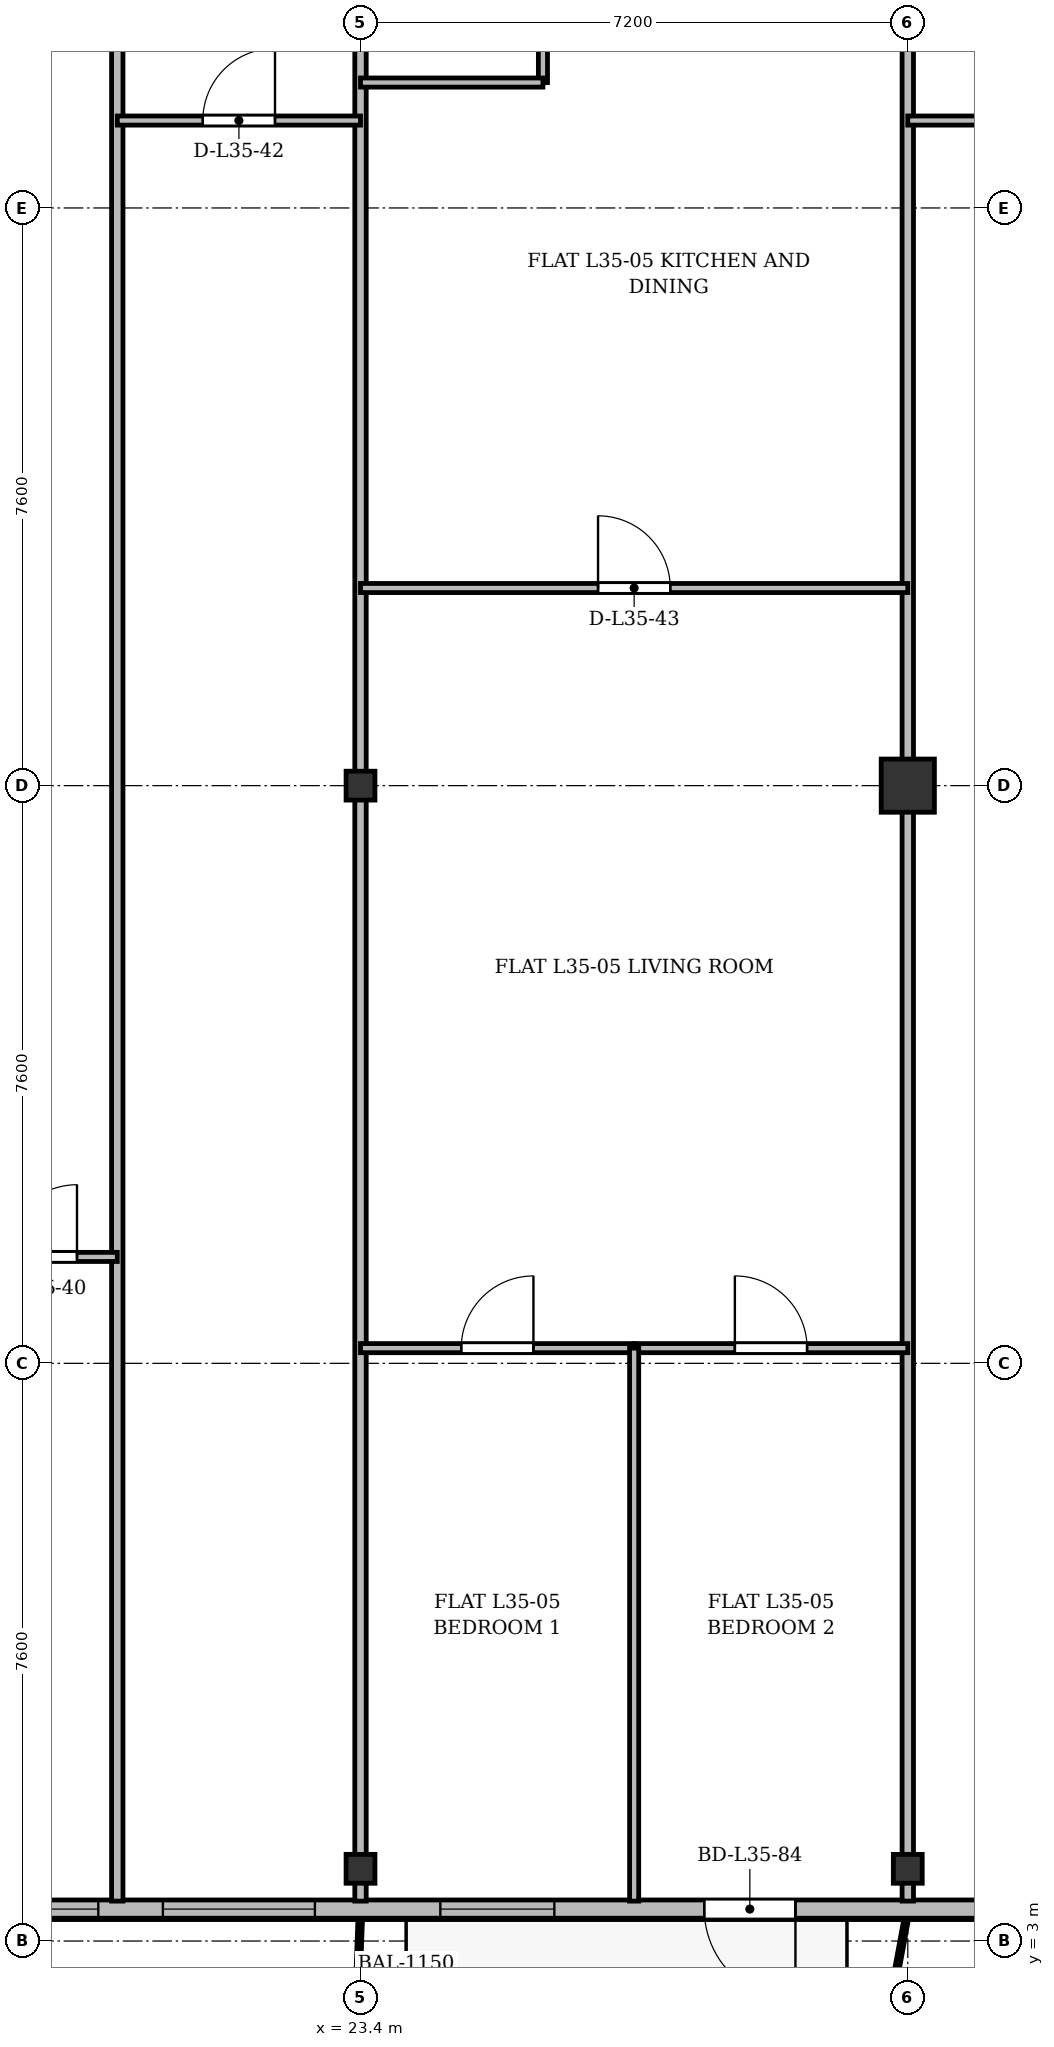
"""IFC4 building model, lengths in metres.
Left out: names, types, materials, properties, quantities, classifications, styles, units other than length and angle.
Written with IfcOpenShell. Run it as: python <this file> out.ifc"""

import sys

from ifc_helpers import new_model, si_unit, direction, frame, frame_2d, origin, origin_2d, place, context, subcontext, project, spatial, rectangle, i_section, extrude, source, transform, mapped, element, fill, save


model = new_model("IFC4")
c1 = context("Model", 3, precision=1e-05, world=origin(), true_north=direction((0.0, 1.0)))
c2 = subcontext(c1, "Body", "Model", "MODEL_VIEW")
j1 = project(units=[si_unit("LENGTHUNIT", "METRE"), si_unit("PLANEANGLEUNIT", "RADIAN")], contexts=[c1])
p1 = place(None, origin())
s1 = spatial("IfcSite", under=j1, at=p1, CompositionType="ELEMENT")
p2 = place(p1, origin())
s2 = spatial("IfcBuilding", under=s1, at=p2, CompositionType="ELEMENT")
p3 = place(p2, frame((0.0, 0.0, 135.7)))
s3 = spatial("IfcBuildingStorey", under=s2, at=p3, CompositionType="ELEMENT", Elevation=135.7)
m1 = source(origin(), c2, "Body", "SweptSolid", [
    extrude(i_section(OverallWidth=0.38, OverallDepth=0.38, WebThickness=0.02, FlangeThickness=0.03, at=origin_2d()), origin(), (0.0, 0.0, 1.0), 3.6),
])
for number, where, z_axis, x_axis in (
    (1, (23.4, 3.95, 0.0), (0.0, 0.0, 1.0), (1.0, 0.0, 0.0)),
    (2, (23.4, 18.2, 0.0), (0.0, 0.0, 1.0), (1.0, 0.0, 0.0)),
    (3, (30.6, 3.95, 0.0), (0.0, 0.0, 1.0), (1.0, 0.0, 0.0)),
):
    element("IfcColumn", number, at=place(p3, frame(where, z_axis=z_axis, x_axis=x_axis)), inside=s3, PredefinedType="COLUMN", context=c2, shape_type="MappedRepresentation", body=[
        mapped(m1, transform((0.0, 0.0, 0.0), x_axis=(1.0, 0.0, 0.0), y_axis=(0.0, 1.0, 0.0), z_axis=(0.0, 0.0, 1.0), scale=1.0)),
    ])
m2 = source(origin(), c2, "Body", "SweptSolid", [
    extrude(rectangle(XDim=0.7, YDim=0.7, at=origin_2d()), origin(), (0.0, 0.0, 1.0), 3.6),
])
p4 = place(p3, frame((30.6, 18.2, 0.0), z_axis=(0.0, 0.0, 1.0), x_axis=(1.0, 0.0, 0.0)))
e4 = element("IfcColumn", 4, at=p4, inside=s3, PredefinedType="COLUMN", context=c2, shape_type="MappedRepresentation", body=[
    mapped(m2, transform((0.0, 0.0, 0.0), x_axis=(1.0, 0.0, 0.0), y_axis=(0.0, 1.0, 0.0), z_axis=(0.0, 0.0, 1.0), scale=1.0)),
])
p5 = place(p3, frame((63.6, 3.42, 0.0), z_axis=(0.0, 0.0, 1.0), x_axis=(-1.0, 0.0, 0.0)))
e5 = element("IfcWall", 5, at=p5, inside=s3, PredefinedType="SOLIDWALL", context=c2, shape_type="SweptSolid", body=[
    extrude(rectangle(XDim=52.8, YDim=0.24, at=frame_2d((26.4, 0.0))), origin(), (0.0, 0.0, 1.0), 3.35),
])
p6 = place(p5, frame((0.345, 0.0, 0.9)))
e6 = element("IfcOpeningElement", 6, at=p6, cuts=e5, PredefinedType="OPENING", context=c2, shape_type="SweptSolid", body=[
    extrude(rectangle(XDim=1.8, YDim=1.8, at=frame_2d((0.9, 0.9))), frame((0.0, 0.13, 0.0), z_axis=(0.0, -1.0, 0.0), x_axis=(1.0, 0.0, 0.0)), (0.0, 0.0, 1.0), 0.26),
])
p7 = place(p5, frame((2.9, 0.0, 0.9)))
e7 = element("IfcOpeningElement", 7, at=p7, cuts=e5, PredefinedType="OPENING", context=c2, shape_type="SweptSolid", body=[
    extrude(rectangle(XDim=1.5, YDim=1.75, at=frame_2d((0.75, 0.875))), frame((0.0, 0.13, 0.0), z_axis=(0.0, -1.0, 0.0), x_axis=(1.0, 0.0, 0.0)), (0.0, 0.0, 1.0), 0.26),
])
p8 = place(p5, frame((5.902, 0.0, 0.0)))
e8 = element("IfcOpeningElement", 8, at=p8, cuts=e5, PredefinedType="OPENING", context=c2, shape_type="SweptSolid", body=[
    extrude(rectangle(XDim=1.2, YDim=2.2, at=frame_2d((0.6, 1.1))), frame((0.0, 0.13, 0.0), z_axis=(0.0, -1.0, 0.0), x_axis=(1.0, 0.0, 0.0)), (0.0, 0.0, 1.0), 0.26),
])
p9 = place(p5, frame((7.65, 0.0, 0.9)))
e9 = element("IfcOpeningElement", 9, at=p9, cuts=e5, PredefinedType="OPENING", context=c2, shape_type="SweptSolid", body=[
    extrude(rectangle(XDim=1.5, YDim=1.75, at=frame_2d((0.75, 0.875))), frame((0.0, 0.13, 0.0), z_axis=(0.0, -1.0, 0.0), x_axis=(1.0, 0.0, 0.0)), (0.0, 0.0, 1.0), 0.26),
])
p10 = place(p5, frame((10.175, 0.0, 0.9)))
e10 = element("IfcOpeningElement", 10, at=p10, cuts=e5, PredefinedType="OPENING", context=c2, shape_type="SweptSolid", body=[
    extrude(rectangle(XDim=1.65, YDim=1.85, at=frame_2d((0.825, 0.925))), frame((0.0, 0.13, 0.0), z_axis=(0.0, -1.0, 0.0), x_axis=(1.0, 0.0, 0.0)), (0.0, 0.0, 1.0), 0.26),
])
p11 = place(p5, frame((12.9, 0.0, 0.9)))
e11 = element("IfcOpeningElement", 11, at=p11, cuts=e5, PredefinedType="OPENING", context=c2, shape_type="SweptSolid", body=[
    extrude(rectangle(XDim=1.8, YDim=1.8, at=frame_2d((0.9, 0.9))), frame((0.0, 0.13, 0.0), z_axis=(0.0, -1.0, 0.0), x_axis=(1.0, 0.0, 0.0)), (0.0, 0.0, 1.0), 0.26),
])
p12 = place(p5, frame((15.45, 0.0, 0.9)))
e12 = element("IfcOpeningElement", 12, at=p12, cuts=e5, PredefinedType="OPENING", context=c2, shape_type="SweptSolid", body=[
    extrude(rectangle(XDim=1.5, YDim=1.75, at=frame_2d((0.75, 0.875))), frame((0.0, 0.13, 0.0), z_axis=(0.0, -1.0, 0.0), x_axis=(1.0, 0.0, 0.0)), (0.0, 0.0, 1.0), 0.26),
])
p13 = place(p5, frame((17.85, 0.0, 0.9)))
e13 = element("IfcOpeningElement", 13, at=p13, cuts=e5, PredefinedType="OPENING", context=c2, shape_type="SweptSolid", body=[
    extrude(rectangle(XDim=1.5, YDim=1.75, at=frame_2d((0.75, 0.875))), frame((0.0, 0.13, 0.0), z_axis=(0.0, -1.0, 0.0), x_axis=(1.0, 0.0, 0.0)), (0.0, 0.0, 1.0), 0.26),
])
p14 = place(p5, frame((20.45, 0.0, 0.9)))
e14 = element("IfcOpeningElement", 14, at=p14, cuts=e5, PredefinedType="OPENING", context=c2, shape_type="SweptSolid", body=[
    extrude(rectangle(XDim=2.0, YDim=1.95, at=frame_2d((1.0, 0.975))), frame((0.0, 0.13, 0.0), z_axis=(0.0, -1.0, 0.0), x_axis=(1.0, 0.0, 0.0)), (0.0, 0.0, 1.0), 0.26),
])
p15 = place(p5, frame((23.925, 0.0, 0.9)))
e15 = element("IfcOpeningElement", 15, at=p15, cuts=e5, PredefinedType="OPENING", context=c2, shape_type="SweptSolid", body=[
    extrude(rectangle(XDim=1.65, YDim=1.85, at=frame_2d((0.825, 0.925))), frame((0.0, 0.13, 0.0), z_axis=(0.0, -1.0, 0.0), x_axis=(1.0, 0.0, 0.0)), (0.0, 0.0, 1.0), 0.26),
])
p16 = place(p5, frame((28.8, 0.0, 0.9)))
e16 = element("IfcOpeningElement", 16, at=p16, cuts=e5, PredefinedType="OPENING", context=c2, shape_type="SweptSolid", body=[
    extrude(rectangle(XDim=1.8, YDim=1.8, at=frame_2d((0.9, 0.9))), frame((0.0, 0.13, 0.0), z_axis=(0.0, -1.0, 0.0), x_axis=(1.0, 0.0, 0.0)), (0.0, 0.0, 1.0), 0.26),
])
p17 = place(p5, frame((34.478, 0.0, 0.0)))
e17 = element("IfcOpeningElement", 17, at=p17, cuts=e5, PredefinedType="OPENING", context=c2, shape_type="SweptSolid", body=[
    extrude(rectangle(XDim=1.2, YDim=2.2, at=frame_2d((0.6, 1.1))), frame((0.0, 0.13, 0.0), z_axis=(0.0, -1.0, 0.0), x_axis=(1.0, 0.0, 0.0)), (0.0, 0.0, 1.0), 0.26),
])
p18 = place(p5, frame((37.65, 0.0, 0.9)))
e18 = element("IfcOpeningElement", 18, at=p18, cuts=e5, PredefinedType="OPENING", context=c2, shape_type="SweptSolid", body=[
    extrude(rectangle(XDim=1.5, YDim=1.75, at=frame_2d((0.75, 0.875))), frame((0.0, 0.13, 0.0), z_axis=(0.0, -1.0, 0.0), x_axis=(1.0, 0.0, 0.0)), (0.0, 0.0, 1.0), 0.26),
])
p19 = place(p5, frame((40.8, 0.0, 0.9)))
e19 = element("IfcOpeningElement", 19, at=p19, cuts=e5, PredefinedType="OPENING", context=c2, shape_type="SweptSolid", body=[
    extrude(rectangle(XDim=2.0, YDim=1.95, at=frame_2d((1.0, 0.975))), frame((0.0, 0.13, 0.0), z_axis=(0.0, -1.0, 0.0), x_axis=(1.0, 0.0, 0.0)), (0.0, 0.0, 1.0), 0.26),
])
p20 = place(p5, frame((43.65, 0.0, 0.9)))
e20 = element("IfcOpeningElement", 20, at=p20, cuts=e5, PredefinedType="OPENING", context=c2, shape_type="SweptSolid", body=[
    extrude(rectangle(XDim=1.5, YDim=1.75, at=frame_2d((0.75, 0.875))), frame((0.0, 0.13, 0.0), z_axis=(0.0, -1.0, 0.0), x_axis=(1.0, 0.0, 0.0)), (0.0, 0.0, 1.0), 0.26),
])
p21 = place(p5, frame((45.7, 0.0, 0.9)))
e21 = element("IfcOpeningElement", 21, at=p21, cuts=e5, PredefinedType="OPENING", context=c2, shape_type="SweptSolid", body=[
    extrude(rectangle(XDim=1.8, YDim=1.8, at=frame_2d((0.9, 0.9))), frame((0.0, 0.13, 0.0), z_axis=(0.0, -1.0, 0.0), x_axis=(1.0, 0.0, 0.0)), (0.0, 0.0, 1.0), 0.26),
])
p22 = place(p5, frame((48.25, 0.0, 0.9)))
e22 = element("IfcOpeningElement", 22, at=p22, cuts=e5, PredefinedType="OPENING", context=c2, shape_type="SweptSolid", body=[
    extrude(rectangle(XDim=1.5, YDim=1.75, at=frame_2d((0.75, 0.875))), frame((0.0, 0.13, 0.0), z_axis=(0.0, -1.0, 0.0), x_axis=(1.0, 0.0, 0.0)), (0.0, 0.0, 1.0), 0.26),
])
p23 = place(p5, frame((50.705, 0.0, 0.9)))
e23 = element("IfcOpeningElement", 23, at=p23, cuts=e5, PredefinedType="OPENING", context=c2, shape_type="SweptSolid", body=[
    extrude(rectangle(XDim=1.5, YDim=1.75, at=frame_2d((0.75, 0.875))), frame((0.0, 0.13, 0.0), z_axis=(0.0, -1.0, 0.0), x_axis=(1.0, 0.0, 0.0)), (0.0, 0.0, 1.0), 0.26),
])
for number, where, z_axis, x_axis in (
    (24, (23.4, 3.525, 0.0), (0.0, 0.0, 1.0), (0.0, 1.0, 0.0)),
    (25, (30.6, 3.525, 0.0), (0.0, 0.0, 1.0), (0.0, 1.0, 0.0)),
):
    element("IfcWall", number, at=place(p3, frame(where, z_axis=z_axis, x_axis=x_axis)), inside=s3, PredefinedType="PARTITIONING", context=c2, shape_type="SweptSolid", body=[
        extrude(rectangle(XDim=27.275, YDim=0.15, at=frame_2d((13.638, 0.0))), origin(), (0.0, 0.0, 1.0), 2.85),
    ])
p24 = place(p3, frame((20.2, 3.525, 0.0), z_axis=(0.0, 0.0, 1.0), x_axis=(0.0, 1.0, 0.0)))
e26 = element("IfcWall", 26, at=p24, inside=s3, PredefinedType="PARTITIONING", context=c2, shape_type="SweptSolid", body=[
    extrude(rectangle(XDim=27.275, YDim=0.15, at=frame_2d((13.638, 0.0))), origin(), (0.0, 0.0, 1.0), 2.75),
])
p25 = place(p3, frame((18.2, 12.0, 0.0), z_axis=(0.0, 0.0, 1.0), x_axis=(1.0, 0.0, 0.0)))
e27 = element("IfcWall", 27, at=p25, inside=s3, PredefinedType="PARTITIONING", context=c2, shape_type="SweptSolid", body=[
    extrude(rectangle(XDim=2.0, YDim=0.12, at=frame_2d((1.0, 0.0))), origin(), (0.0, 0.0, 1.0), 3.35),
])
p26 = place(p25, frame((0.52, 0.0, 0.0)))
e28 = element("IfcOpeningElement", 28, at=p26, cuts=e27, PredefinedType="OPENING", context=c2, shape_type="SweptSolid", body=[
    extrude(rectangle(XDim=0.95, YDim=2.15, at=frame_2d((0.475, 1.075))), frame((0.0, 0.07, 0.0), z_axis=(0.0, -1.0, 0.0), x_axis=(1.0, 0.0, 0.0)), (0.0, 0.0, 1.0), 0.14),
])
p27 = place(p3, frame((20.2, 26.95, 0.0), z_axis=(0.0, 0.0, 1.0), x_axis=(1.0, 0.0, 0.0)))
e29 = element("IfcWall", 29, at=p27, inside=s3, PredefinedType="PARTITIONING", context=c2, shape_type="SweptSolid", body=[
    extrude(rectangle(XDim=3.2, YDim=0.12, at=frame_2d((1.6, 0.0))), origin(), (0.0, 0.0, 1.0), 2.85),
])
p28 = place(p27, frame((1.125, 0.0, 0.0)))
e30 = element("IfcOpeningElement", 30, at=p28, cuts=e29, PredefinedType="OPENING", context=c2, shape_type="SweptSolid", body=[
    extrude(rectangle(XDim=0.95, YDim=2.15, at=frame_2d((0.475, 1.075))), frame((0.0, 0.07, 0.0), z_axis=(0.0, -1.0, 0.0), x_axis=(1.0, 0.0, 0.0)), (0.0, 0.0, 1.0), 0.14),
])
p29 = place(p3, frame((23.4, 20.8, 0.0), z_axis=(0.0, 0.0, 1.0), x_axis=(1.0, 0.0, 0.0)))
e31 = element("IfcWall", 31, at=p29, inside=s3, PredefinedType="PARTITIONING", context=c2, shape_type="SweptSolid", body=[
    extrude(rectangle(XDim=7.2, YDim=0.12, at=frame_2d((3.6, 0.0))), origin(), (0.0, 0.0, 1.0), 2.85),
])
p30 = place(p29, frame((3.125, 0.0, 0.0)))
e32 = element("IfcOpeningElement", 32, at=p30, cuts=e31, PredefinedType="OPENING", context=c2, shape_type="SweptSolid", body=[
    extrude(rectangle(XDim=0.95, YDim=2.15, at=frame_2d((0.475, 1.075))), frame((0.0, 0.07, 0.0), z_axis=(0.0, -1.0, 0.0), x_axis=(1.0, 0.0, 0.0)), (0.0, 0.0, 1.0), 0.14),
])
p31 = place(p3, frame((25.8, 27.45, 0.0), z_axis=(0.0, 0.0, 1.0), x_axis=(0.0, 1.0, 0.0)))
e33 = element("IfcWall", 33, at=p31, inside=s3, PredefinedType="PARTITIONING", context=c2, shape_type="SweptSolid", body=[
    extrude(rectangle(XDim=3.35, YDim=0.12, at=frame_2d((1.675, 0.0))), origin(), (0.0, 0.0, 1.0), 3.35),
])
p32 = place(p31, frame((0.8, 0.0, 0.0)))
e34 = element("IfcOpeningElement", 34, at=p32, cuts=e33, PredefinedType="OPENING", context=c2, shape_type="SweptSolid", body=[
    extrude(rectangle(XDim=0.85, YDim=2.1, at=frame_2d((0.425, 1.05))), frame((0.0, 0.07, 0.0), z_axis=(0.0, -1.0, 0.0), x_axis=(1.0, 0.0, 0.0)), (0.0, 0.0, 1.0), 0.14),
])
p33 = place(p3, frame((23.4, 27.45, 0.0), z_axis=(0.0, 0.0, 1.0), x_axis=(1.0, 0.0, 0.0)))
e35 = element("IfcWall", 35, at=p33, inside=s3, PredefinedType="PARTITIONING", context=c2, shape_type="SweptSolid", body=[
    extrude(rectangle(XDim=2.4, YDim=0.12, at=frame_2d((1.2, 0.0))), origin(), (0.0, 0.0, 1.0), 2.85),
])
p34 = place(p3, frame((23.4, 10.8, 0.0), z_axis=(0.0, 0.0, 1.0), x_axis=(1.0, 0.0, 0.0)))
e36 = element("IfcWall", 36, at=p34, inside=s3, PredefinedType="PARTITIONING", context=c2, shape_type="SweptSolid", body=[
    extrude(rectangle(XDim=3.6, YDim=0.12, at=frame_2d((1.8, 0.0))), origin(), (0.0, 0.0, 1.0), 2.85),
])
p35 = place(p34, frame((1.325, 0.0, 0.0)))
e37 = element("IfcOpeningElement", 37, at=p35, cuts=e36, PredefinedType="OPENING", context=c2, shape_type="SweptSolid", body=[
    extrude(rectangle(XDim=0.95, YDim=2.15, at=frame_2d((0.475, 1.075))), frame((0.0, 0.07, 0.0), z_axis=(0.0, -1.0, 0.0), x_axis=(1.0, 0.0, 0.0)), (0.0, 0.0, 1.0), 0.14),
])
p36 = place(p3, frame((27.0, 10.8, 0.0), z_axis=(0.0, 0.0, 1.0), x_axis=(1.0, 0.0, 0.0)))
e38 = element("IfcWall", 38, at=p36, inside=s3, PredefinedType="PARTITIONING", context=c2, shape_type="SweptSolid", body=[
    extrude(rectangle(XDim=3.6, YDim=0.12, at=frame_2d((1.8, 0.0))), origin(), (0.0, 0.0, 1.0), 2.85),
])
p37 = place(p36, frame((1.325, 0.0, 0.0)))
e39 = element("IfcOpeningElement", 39, at=p37, cuts=e38, PredefinedType="OPENING", context=c2, shape_type="SweptSolid", body=[
    extrude(rectangle(XDim=0.95, YDim=2.15, at=frame_2d((0.475, 1.075))), frame((0.0, 0.07, 0.0), z_axis=(0.0, -1.0, 0.0), x_axis=(1.0, 0.0, 0.0)), (0.0, 0.0, 1.0), 0.14),
])
p38 = place(p3, frame((27.0, 3.525, 0.0), z_axis=(0.0, 0.0, 1.0), x_axis=(0.0, 1.0, 0.0)))
e40 = element("IfcWall", 40, at=p38, inside=s3, PredefinedType="PARTITIONING", context=c2, shape_type="SweptSolid", body=[
    extrude(rectangle(XDim=7.275, YDim=0.12, at=frame_2d((3.638, 0.0))), origin(), (0.0, 0.0, 1.0), 2.75),
])
p39 = place(p3, frame((30.6, 26.95, 0.0), z_axis=(0.0, 0.0, 1.0), x_axis=(1.0, 0.0, 0.0)))
e41 = element("IfcWall", 41, at=p39, inside=s3, PredefinedType="PARTITIONING", context=c2, shape_type="SweptSolid", body=[
    extrude(rectangle(XDim=6.6, YDim=0.12, at=frame_2d((3.3, 0.0))), origin(), (0.0, 0.0, 1.0), 2.85),
])
p40 = place(p39, frame((2.734, 0.0, 0.0)))
e42 = element("IfcOpeningElement", 42, at=p40, cuts=e41, PredefinedType="OPENING", context=c2, shape_type="SweptSolid", body=[
    extrude(rectangle(XDim=0.95, YDim=2.15, at=frame_2d((0.475, 1.075))), frame((0.0, 0.07, 0.0), z_axis=(0.0, -1.0, 0.0), x_axis=(1.0, 0.0, 0.0)), (0.0, 0.0, 1.0), 0.14),
])
m3 = source(origin(), c2, "Body", "SweptSolid", [
    extrude(rectangle(XDim=1.2, YDim=2.2, at=frame_2d((0.6, 1.1))), frame((0.0, 0.025, 0.0), z_axis=(0.0, -1.0, 0.0), x_axis=(1.0, 0.0, 0.0)), (0.0, 0.0, 1.0), 0.05),
])
p41 = place(p17, origin())
e43 = element("IfcDoor", 43, at=p41, inside=s3, OperationType="SINGLE_SWING_LEFT", PredefinedType="DOOR", context=c2, shape_type="MappedRepresentation", body=[
    mapped(m3, transform((0.0, 0.0, 0.0), x_axis=(1.0, 0.0, 0.0), y_axis=(0.0, 1.0, 0.0), z_axis=(0.0, 0.0, 1.0), scale=1.0)),
])
fill(e17, e43)
m4 = source(origin(), c2, "Body", "SweptSolid", [
    extrude(rectangle(XDim=1.5, YDim=1.75, at=frame_2d((0.75, 0.875))), frame((0.0, 0.03, 0.0), z_axis=(0.0, -1.0, 0.0), x_axis=(1.0, 0.0, 0.0)), (0.0, 0.0, 1.0), 0.06),
])
p42 = place(p18, origin())
e44 = element("IfcWindow", 44, at=p42, inside=s3, PartitioningType="SINGLE_PANEL", PredefinedType="WINDOW", context=c2, shape_type="MappedRepresentation", body=[
    mapped(m4, transform((0.0, 0.0, 0.0), x_axis=(1.0, 0.0, 0.0), y_axis=(0.0, 1.0, 0.0), z_axis=(0.0, 0.0, 1.0), scale=1.0)),
])
fill(e18, e44)
m5 = source(origin(), c2, "Body", "SweptSolid", [
    extrude(rectangle(XDim=2.0, YDim=1.95, at=frame_2d((1.0, 0.975))), frame((0.0, 0.03, 0.0), z_axis=(0.0, -1.0, 0.0), x_axis=(1.0, 0.0, 0.0)), (0.0, 0.0, 1.0), 0.06),
])
p43 = place(p19, origin())
e45 = element("IfcWindow", 45, at=p43, inside=s3, PartitioningType="SINGLE_PANEL", PredefinedType="WINDOW", context=c2, shape_type="MappedRepresentation", body=[
    mapped(m5, transform((0.0, 0.0, 0.0), x_axis=(1.0, 0.0, 0.0), y_axis=(0.0, 1.0, 0.0), z_axis=(0.0, 0.0, 1.0), scale=1.0)),
])
fill(e19, e45)
p44 = place(p20, origin())
e46 = element("IfcWindow", 46, at=p44, inside=s3, PartitioningType="SINGLE_PANEL", PredefinedType="WINDOW", context=c2, shape_type="MappedRepresentation", body=[
    mapped(m4, transform((0.0, 0.0, 0.0), x_axis=(1.0, 0.0, 0.0), y_axis=(0.0, 1.0, 0.0), z_axis=(0.0, 0.0, 1.0), scale=1.0)),
])
fill(e20, e46)
m6 = source(origin(), c2, "Body", "SweptSolid", [
    extrude(rectangle(XDim=0.95, YDim=2.15, at=frame_2d((0.475, 1.075))), frame((0.0, 0.025, 0.0), z_axis=(0.0, -1.0, 0.0), x_axis=(1.0, 0.0, 0.0)), (0.0, 0.0, 1.0), 0.05),
])
p45 = place(p26, origin())
e47 = element("IfcDoor", 47, at=p45, inside=s3, OperationType="SINGLE_SWING_RIGHT", PredefinedType="DOOR", context=c2, shape_type="MappedRepresentation", body=[
    mapped(m6, transform((0.0, 0.0, 0.0), x_axis=(1.0, 0.0, 0.0), y_axis=(0.0, 1.0, 0.0), z_axis=(0.0, 0.0, 1.0), scale=1.0)),
])
fill(e28, e47)
p46 = place(p28, origin())
e48 = element("IfcDoor", 48, at=p46, inside=s3, OperationType="SINGLE_SWING_RIGHT", PredefinedType="DOOR", context=c2, shape_type="MappedRepresentation", body=[
    mapped(m6, transform((0.0, 0.0, 0.0), x_axis=(1.0, 0.0, 0.0), y_axis=(0.0, 1.0, 0.0), z_axis=(0.0, 0.0, 1.0), scale=1.0)),
])
fill(e30, e48)
p47 = place(p30, origin())
e49 = element("IfcDoor", 49, at=p47, inside=s3, OperationType="SINGLE_SWING_LEFT", PredefinedType="DOOR", context=c2, shape_type="MappedRepresentation", body=[
    mapped(m6, transform((0.0, 0.0, 0.0), x_axis=(1.0, 0.0, 0.0), y_axis=(0.0, 1.0, 0.0), z_axis=(0.0, 0.0, 1.0), scale=1.0)),
])
fill(e32, e49)
p48 = place(p35, origin())
e50 = element("IfcDoor", 50, at=p48, inside=s3, OperationType="SINGLE_SWING_RIGHT", PredefinedType="DOOR", context=c2, shape_type="MappedRepresentation", body=[
    mapped(m6, transform((0.0, 0.0, 0.0), x_axis=(1.0, 0.0, 0.0), y_axis=(0.0, 1.0, 0.0), z_axis=(0.0, 0.0, 1.0), scale=1.0)),
])
fill(e37, e50)
p49 = place(p37, origin())
e51 = element("IfcDoor", 51, at=p49, inside=s3, OperationType="SINGLE_SWING_LEFT", PredefinedType="DOOR", context=c2, shape_type="MappedRepresentation", body=[
    mapped(m6, transform((0.0, 0.0, 0.0), x_axis=(1.0, 0.0, 0.0), y_axis=(0.0, 1.0, 0.0), z_axis=(0.0, 0.0, 1.0), scale=1.0)),
])
fill(e39, e51)
save(model, sys.argv[1])
